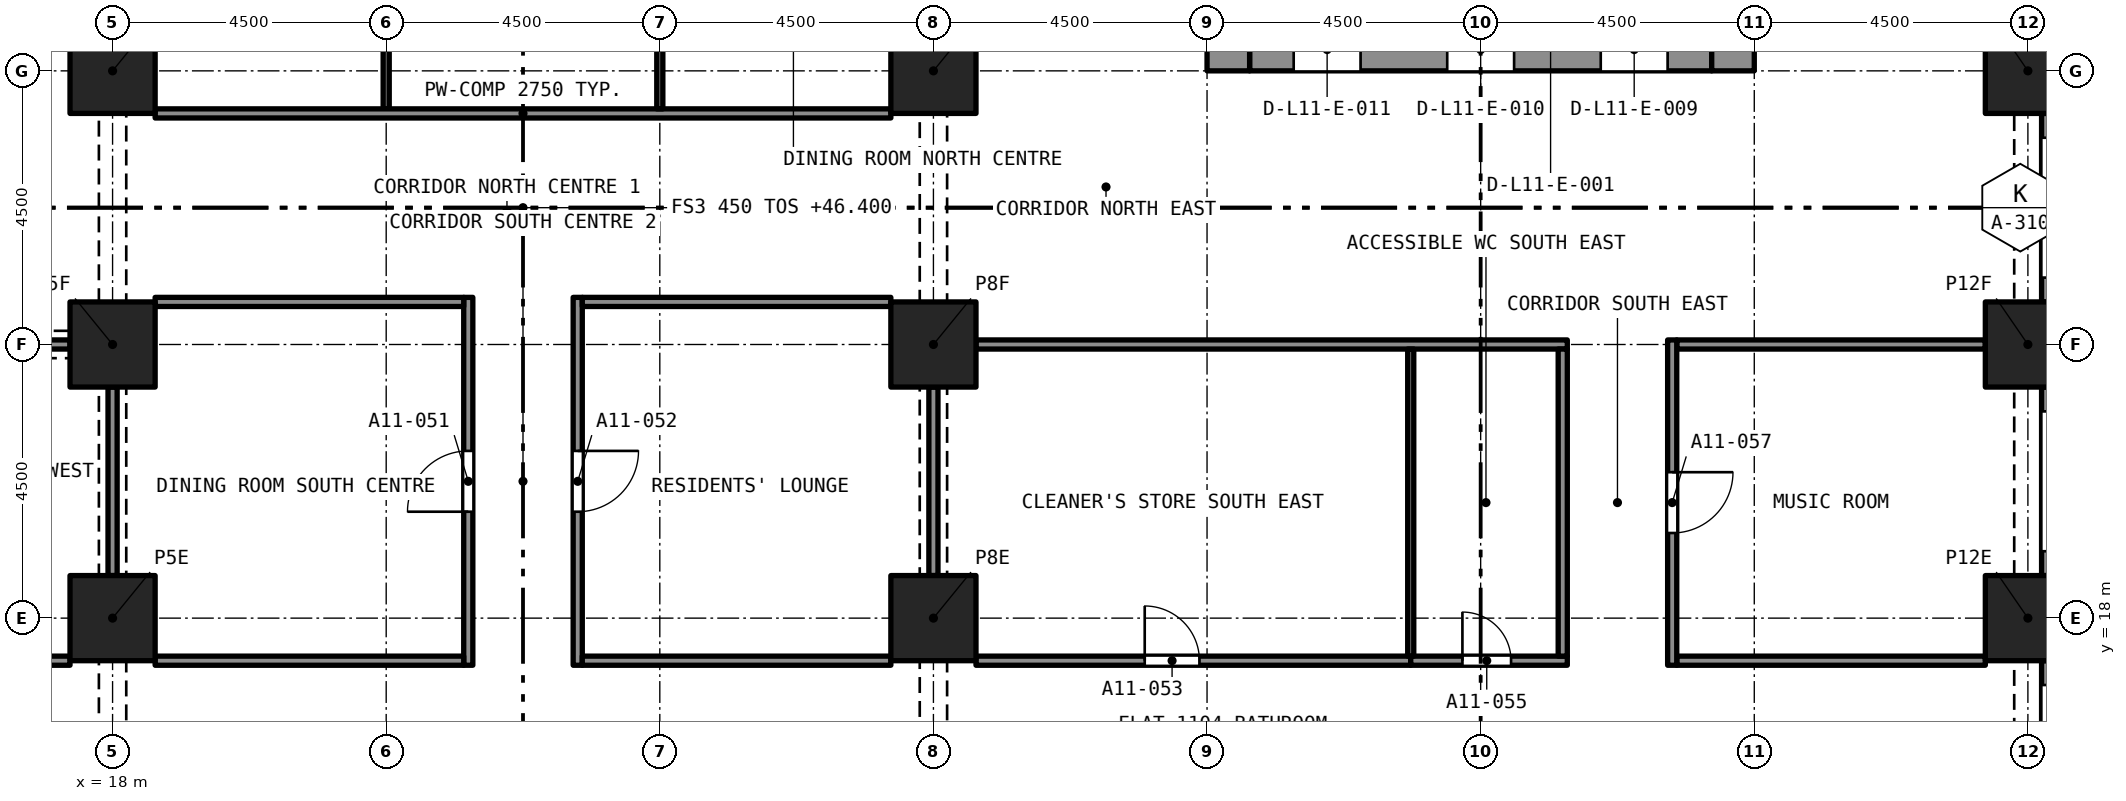
"""IFC4 building model, lengths in metres.
Left out: names, types, materials, properties, quantities, classifications, styles, units other than length and angle.
Written with IfcOpenShell. Run it as: python <this file> out.ifc"""

import sys

from ifc_helpers import new_model, si_unit, direction, frame, frame_2d, origin, origin_2d, place, context, subcontext, project, spatial, rectangle, extrude, element, fill, save


model = new_model("IFC4")
c1 = context("Model", 3, precision=1e-05, world=origin(), true_north=direction((0.0, 1.0)))
c2 = subcontext(c1, "Body", "Model", "MODEL_VIEW")
j1 = project(units=[si_unit("LENGTHUNIT", "METRE"), si_unit("PLANEANGLEUNIT", "RADIAN")], contexts=[c1])
p1 = place(None, origin())
s1 = spatial("IfcSite", under=j1, at=p1, CompositionType="ELEMENT")
p2 = place(p1, origin())
s2 = spatial("IfcBuilding", under=s1, at=p2, CompositionType="ELEMENT")
p3 = place(p2, frame((0.0, 0.0, 46.4)))
s3 = spatial("IfcBuildingStorey", under=s2, at=p3, CompositionType="ELEMENT", Elevation=46.4)
for number, where, z_axis, x_axis in (
    (1, (18.0, 18.0, 0.0), (0.0, 0.0, 1.0), (1.0, 0.0, 0.0)),
    (2, (31.5, 18.0, 0.0), (0.0, 0.0, 1.0), (1.0, 0.0, 0.0)),
    (3, (49.5, 18.0, 0.0), (0.0, 0.0, 1.0), (1.0, 0.0, 0.0)),
    (4, (18.0, 22.5, 0.0), (0.0, 0.0, 1.0), (1.0, 0.0, 0.0)),
    (5, (31.5, 22.5, 0.0), (0.0, 0.0, 1.0), (1.0, 0.0, 0.0)),
    (6, (49.5, 22.5, 0.0), (0.0, 0.0, 1.0), (1.0, 0.0, 0.0)),
    (7, (18.0, 27.0, 0.0), (0.0, 0.0, 1.0), (1.0, 0.0, 0.0)),
    (8, (31.5, 27.0, 0.0), (0.0, 0.0, 1.0), (1.0, 0.0, 0.0)),
    (9, (49.5, 27.0, 0.0), (0.0, 0.0, 1.0), (1.0, 0.0, 0.0)),
):
    element("IfcColumn", number, at=place(p3, frame(where, z_axis=z_axis, x_axis=x_axis)), inside=s3, PredefinedType="COLUMN", context=c2, shape_type="SweptSolid", body=[
        extrude(rectangle(XDim=1.4, YDim=1.4, at=origin_2d()), origin(), (0.0, 0.0, 1.0), 3.2),
    ])
p4 = place(p3, frame((36.7, 27.35, 0.0), z_axis=(0.0, 0.0, 1.0), x_axis=(1.0, 0.0, 0.0)))
e10 = element("IfcWall", 10, at=p4, inside=s3, PredefinedType="SOLIDWALL", context=c2, shape_type="SweptSolid", body=[
    extrude(rectangle(XDim=7.6, YDim=0.7, at=frame_2d((3.8, 0.0))), origin(), (0.0, 0.0, 1.0), 3.2),
])
p5 = place(p4, frame((5.775, 0.0, 0.0)))
e11 = element("IfcOpeningElement", 11, at=p5, cuts=e10, PredefinedType="OPENING", context=c2, shape_type="SweptSolid", body=[
    extrude(rectangle(XDim=1.1, YDim=2.1, at=frame_2d((0.55, 1.05))), frame((0.0, 0.36, 0.0), z_axis=(0.0, -1.0, 0.0), x_axis=(1.0, 0.0, 0.0)), (0.0, 0.0, 1.0), 0.72),
])
p6 = place(p4, frame((3.25, 0.0, 0.0)))
e12 = element("IfcOpeningElement", 12, at=p6, cuts=e10, PredefinedType="OPENING", context=c2, shape_type="SweptSolid", body=[
    extrude(rectangle(XDim=1.1, YDim=2.1, at=frame_2d((0.55, 1.05))), frame((0.0, 0.36, 0.0), z_axis=(0.0, -1.0, 0.0), x_axis=(1.0, 0.0, 0.0)), (0.0, 0.0, 1.0), 0.72),
])
p7 = place(p4, frame((0.725, 0.0, 0.0)))
e13 = element("IfcOpeningElement", 13, at=p7, cuts=e10, PredefinedType="OPENING", context=c2, shape_type="SweptSolid", body=[
    extrude(rectangle(XDim=1.1, YDim=2.1, at=frame_2d((0.55, 1.05))), frame((0.0, 0.36, 0.0), z_axis=(0.0, -1.0, 0.0), x_axis=(1.0, 0.0, 0.0)), (0.0, 0.0, 1.0), 0.72),
])
p8 = place(p3, frame((36.35, 27.0, 0.0), z_axis=(0.0, 0.0, 1.0), x_axis=(0.0, 1.0, 0.0)))
e14 = element("IfcWall", 14, at=p8, inside=s3, PredefinedType="SOLIDWALL", context=c2, shape_type="SweptSolid", body=[
    extrude(rectangle(XDim=13.5, YDim=0.7, at=frame_2d((6.75, 0.0))), origin(), (0.0, 0.0, 1.0), 3.2),
])
p9 = place(p8, frame((8.95, 0.0, 0.0)))
e15 = element("IfcOpeningElement", 15, at=p9, cuts=e14, PredefinedType="OPENING", context=c2, shape_type="SweptSolid", body=[
    extrude(rectangle(XDim=1.2, YDim=2.1, at=frame_2d((0.6, 1.05))), frame((0.0, 0.36, 0.0), z_axis=(0.0, -1.0, 0.0), x_axis=(1.0, 0.0, 0.0)), (0.0, 0.0, 1.0), 0.72),
])
p10 = place(p3, frame((44.65, 27.0, 0.0), z_axis=(0.0, 0.0, 1.0), x_axis=(0.0, 1.0, 0.0)))
e16 = element("IfcWall", 16, at=p10, inside=s3, PredefinedType="SOLIDWALL", context=c2, shape_type="SweptSolid", body=[
    extrude(rectangle(XDim=13.5, YDim=0.7, at=frame_2d((6.75, 0.0))), origin(), (0.0, 0.0, 1.0), 3.2),
])
p11 = place(p10, frame((8.95, 0.0, 0.0)))
e17 = element("IfcOpeningElement", 17, at=p11, cuts=e16, PredefinedType="OPENING", context=c2, shape_type="SweptSolid", body=[
    extrude(rectangle(XDim=1.2, YDim=2.1, at=frame_2d((0.6, 1.05))), frame((0.0, 0.36, 0.0), z_axis=(0.0, -1.0, 0.0), x_axis=(1.0, 0.0, 0.0)), (0.0, 0.0, 1.0), 0.72),
])
p12 = place(p3, frame((49.875, 17.3, 0.0), z_axis=(0.0, 0.0, 1.0), x_axis=(0.0, -1.0, 0.0)))
e18 = element("IfcWall", 18, at=p12, inside=s3, PredefinedType="SOLIDWALL", context=c2, shape_type="SweptSolid", body=[
    extrude(rectangle(XDim=3.1, YDim=0.3, at=frame_2d((1.55, 0.0))), origin(), (0.0, 0.0, 1.0), 3.2),
])
p13 = place(p12, frame((0.4, 0.0, 0.45)))
e19 = element("IfcOpeningElement", 19, at=p13, cuts=e18, PredefinedType="OPENING", context=c2, shape_type="SweptSolid", body=[
    extrude(rectangle(XDim=2.3, YDim=1.95, at=frame_2d((1.15, 0.975))), frame((0.0, 0.16, 0.0), z_axis=(0.0, -1.0, 0.0), x_axis=(1.0, 0.0, 0.0)), (0.0, 0.0, 1.0), 0.32),
])
p14 = place(p3, frame((49.875, 21.8, 0.0), z_axis=(0.0, 0.0, 1.0), x_axis=(0.0, -1.0, 0.0)))
e20 = element("IfcWall", 20, at=p14, inside=s3, PredefinedType="SOLIDWALL", context=c2, shape_type="SweptSolid", body=[
    extrude(rectangle(XDim=3.1, YDim=0.3, at=frame_2d((1.55, 0.0))), origin(), (0.0, 0.0, 1.0), 3.2),
])
p15 = place(p14, frame((0.4, 0.0, 0.45)))
e21 = element("IfcOpeningElement", 21, at=p15, cuts=e20, PredefinedType="OPENING", context=c2, shape_type="SweptSolid", body=[
    extrude(rectangle(XDim=2.3, YDim=1.95, at=frame_2d((1.15, 0.975))), frame((0.0, 0.16, 0.0), z_axis=(0.0, -1.0, 0.0), x_axis=(1.0, 0.0, 0.0)), (0.0, 0.0, 1.0), 0.32),
])
p16 = place(p3, frame((49.875, 26.3, 0.0), z_axis=(0.0, 0.0, 1.0), x_axis=(0.0, -1.0, 0.0)))
e22 = element("IfcWall", 22, at=p16, inside=s3, PredefinedType="SOLIDWALL", context=c2, shape_type="SweptSolid", body=[
    extrude(rectangle(XDim=3.1, YDim=0.3, at=frame_2d((1.55, 0.0))), origin(), (0.0, 0.0, 1.0), 3.2),
])
p17 = place(p16, frame((0.4, 0.0, 0.45)))
e23 = element("IfcOpeningElement", 23, at=p17, cuts=e22, PredefinedType="OPENING", context=c2, shape_type="SweptSolid", body=[
    extrude(rectangle(XDim=2.3, YDim=1.95, at=frame_2d((1.15, 0.975))), frame((0.0, 0.16, 0.0), z_axis=(0.0, -1.0, 0.0), x_axis=(1.0, 0.0, 0.0)), (0.0, 0.0, 1.0), 0.32),
])
p18 = place(p3, frame((23.85, 17.225, 0.0), z_axis=(0.0, 0.0, 1.0), x_axis=(0.0, 1.0, 0.0)))
e24 = element("IfcWall", 24, at=p18, inside=s3, PredefinedType="PARTITIONING", context=c2, shape_type="SweptSolid", body=[
    extrude(rectangle(XDim=6.05, YDim=0.15, at=frame_2d((3.025, 0.0))), origin(), (0.0, 0.0, 1.0), 2.75),
])
p19 = place(p18, frame((2.525, 0.0, 0.0)))
e25 = element("IfcOpeningElement", 25, at=p19, cuts=e24, PredefinedType="OPENING", context=c2, shape_type="SweptSolid", body=[
    extrude(rectangle(XDim=1.0, YDim=2.1, at=frame_2d((0.5, 1.05))), frame((0.0, 0.085, 0.0), z_axis=(0.0, -1.0, 0.0), x_axis=(1.0, 0.0, 0.0)), (0.0, 0.0, 1.0), 0.17),
])
p20 = place(p3, frame((25.65, 23.275, 0.0), z_axis=(0.0, 0.0, 1.0), x_axis=(0.0, -1.0, 0.0)))
e26 = element("IfcWall", 26, at=p20, inside=s3, PredefinedType="PARTITIONING", context=c2, shape_type="SweptSolid", body=[
    extrude(rectangle(XDim=6.05, YDim=0.15, at=frame_2d((3.025, 0.0))), origin(), (0.0, 0.0, 1.0), 2.75),
])
p21 = place(p20, frame((2.525, 0.0, 0.0)))
e27 = element("IfcOpeningElement", 27, at=p21, cuts=e26, PredefinedType="OPENING", context=c2, shape_type="SweptSolid", body=[
    extrude(rectangle(XDim=1.0, YDim=2.1, at=frame_2d((0.5, 1.05))), frame((0.0, 0.085, 0.0), z_axis=(0.0, -1.0, 0.0), x_axis=(1.0, 0.0, 0.0)), (0.0, 0.0, 1.0), 0.17),
])
for number, where, z_axis, x_axis in (
    (28, (18.7, 17.3, 0.0), (0.0, 0.0, 1.0), (1.0, 0.0, 0.0)),
    (29, (25.725, 17.3, 0.0), (0.0, 0.0, 1.0), (1.0, 0.0, 0.0)),
):
    element("IfcWall", number, at=place(p3, frame(where, z_axis=z_axis, x_axis=x_axis)), inside=s3, PredefinedType="PARTITIONING", context=c2, shape_type="SweptSolid", body=[
        extrude(rectangle(XDim=5.075, YDim=0.15, at=frame_2d((2.538, 0.0))), origin(), (0.0, 0.0, 1.0), 2.75),
    ])
p22 = place(p3, frame((32.2, 17.3, 0.0), z_axis=(0.0, 0.0, 1.0), x_axis=(1.0, 0.0, 0.0)))
e30 = element("IfcWall", 30, at=p22, inside=s3, PredefinedType="PARTITIONING", context=c2, shape_type="SweptSolid", body=[
    extrude(rectangle(XDim=7.15, YDim=0.15, at=frame_2d((3.575, 0.0))), origin(), (0.0, 0.0, 1.0), 2.9),
])
p23 = place(p22, frame((2.775, 0.0, 0.0)))
e31 = element("IfcOpeningElement", 31, at=p23, cuts=e30, PredefinedType="OPENING", context=c2, shape_type="SweptSolid", body=[
    extrude(rectangle(XDim=0.9, YDim=2.1, at=frame_2d((0.45, 1.05))), frame((0.0, 0.085, 0.0), z_axis=(0.0, -1.0, 0.0), x_axis=(1.0, 0.0, 0.0)), (0.0, 0.0, 1.0), 0.17),
])
p24 = place(p3, frame((10.15, 17.3, 0.0), z_axis=(0.0, 0.0, 1.0), x_axis=(1.0, 0.0, 0.0)))
e32 = element("IfcWall", 32, at=p24, inside=s3, PredefinedType="PARTITIONING", context=c2, shape_type="SweptSolid", body=[
    extrude(rectangle(XDim=7.15, YDim=0.15, at=frame_2d((3.575, 0.0))), origin(), (0.0, 0.0, 1.0), 2.9),
])
p25 = place(p24, frame((3.475, 0.0, 0.0)))
e33 = element("IfcOpeningElement", 33, at=p25, cuts=e32, PredefinedType="OPENING", context=c2, shape_type="SweptSolid", body=[
    extrude(rectangle(XDim=0.9, YDim=2.1, at=frame_2d((0.45, 1.05))), frame((0.0, 0.085, 0.0), z_axis=(0.0, -1.0, 0.0), x_axis=(1.0, 0.0, 0.0)), (0.0, 0.0, 1.0), 0.17),
])
p26 = place(p3, frame((39.35, 17.3, 0.0), z_axis=(0.0, 0.0, 1.0), x_axis=(1.0, 0.0, 0.0)))
e34 = element("IfcWall", 34, at=p26, inside=s3, PredefinedType="PARTITIONING", context=c2, shape_type="SweptSolid", body=[
    extrude(rectangle(XDim=2.575, YDim=0.15, at=frame_2d((1.288, 0.0))), origin(), (0.0, 0.0, 1.0), 2.9),
])
p27 = place(p26, frame((0.85, 0.0, 0.0)))
e35 = element("IfcOpeningElement", 35, at=p27, cuts=e34, PredefinedType="OPENING", context=c2, shape_type="SweptSolid", body=[
    extrude(rectangle(XDim=0.8, YDim=2.1, at=frame_2d((0.4, 1.05))), frame((0.0, 0.085, 0.0), z_axis=(0.0, -1.0, 0.0), x_axis=(1.0, 0.0, 0.0)), (0.0, 0.0, 1.0), 0.17),
])
p28 = place(p3, frame((43.725, 17.3, 0.0), z_axis=(0.0, 0.0, 1.0), x_axis=(1.0, 0.0, 0.0)))
e36 = element("IfcWall", 36, at=p28, inside=s3, PredefinedType="PARTITIONING", context=c2, shape_type="SweptSolid", body=[
    extrude(rectangle(XDim=5.075, YDim=0.15, at=frame_2d((2.538, 0.0))), origin(), (0.0, 0.0, 1.0), 2.9),
])
p29 = place(p3, frame((22.5, 26.375, 0.0), z_axis=(0.0, 0.0, 1.0), x_axis=(0.0, 1.0, 0.0)))
e37 = element("IfcWall", 37, at=p29, inside=s3, PredefinedType="PARTITIONING", context=c2, shape_type="SweptSolid", body=[
    extrude(rectangle(XDim=10.25, YDim=0.1, at=frame_2d((5.125, 0.0))), origin(), (0.0, 0.0, 1.0), 2.75),
])
p30 = place(p3, frame((18.7, 26.3, 0.0), z_axis=(0.0, 0.0, 1.0), x_axis=(1.0, 0.0, 0.0)))
e38 = element("IfcWall", 38, at=p30, inside=s3, PredefinedType="PARTITIONING", context=c2, shape_type="SweptSolid", body=[
    extrude(rectangle(XDim=12.1, YDim=0.15, at=frame_2d((6.05, 0.0))), origin(), (0.0, 0.0, 1.0), 2.75),
])
p31 = place(p3, frame((27.0, 26.375, 0.0), z_axis=(0.0, 0.0, 1.0), x_axis=(0.0, 1.0, 0.0)))
e39 = element("IfcWall", 39, at=p31, inside=s3, PredefinedType="PARTITIONING", context=c2, shape_type="SweptSolid", body=[
    extrude(rectangle(XDim=10.25, YDim=0.1, at=frame_2d((5.125, 0.0))), origin(), (0.0, 0.0, 1.0), 2.75),
])
p32 = place(p3, frame((18.7, 23.2, 0.0), z_axis=(0.0, 0.0, 1.0), x_axis=(1.0, 0.0, 0.0)))
e40 = element("IfcWall", 40, at=p32, inside=s3, PredefinedType="PARTITIONING", context=c2, shape_type="SweptSolid", body=[
    extrude(rectangle(XDim=5.075, YDim=0.15, at=frame_2d((2.538, 0.0))), origin(), (0.0, 0.0, 1.0), 2.75),
])
p33 = place(p3, frame((18.0, 18.7, 0.0), z_axis=(0.0, 0.0, 1.0), x_axis=(0.0, 1.0, 0.0)))
e41 = element("IfcWall", 41, at=p33, inside=s3, PredefinedType="PARTITIONING", context=c2, shape_type="SweptSolid", body=[
    extrude(rectangle(XDim=3.1, YDim=0.15, at=frame_2d((1.55, 0.0))), origin(), (0.0, 0.0, 1.0), 2.38),
])
p34 = place(p3, frame((25.725, 23.2, 0.0), z_axis=(0.0, 0.0, 1.0), x_axis=(1.0, 0.0, 0.0)))
e42 = element("IfcWall", 42, at=p34, inside=s3, PredefinedType="PARTITIONING", context=c2, shape_type="SweptSolid", body=[
    extrude(rectangle(XDim=5.075, YDim=0.15, at=frame_2d((2.538, 0.0))), origin(), (0.0, 0.0, 1.0), 2.75),
])
p35 = place(p3, frame((31.5, 18.7, 0.0), z_axis=(0.0, 0.0, 1.0), x_axis=(0.0, 1.0, 0.0)))
e43 = element("IfcWall", 43, at=p35, inside=s3, PredefinedType="PARTITIONING", context=c2, shape_type="SweptSolid", body=[
    extrude(rectangle(XDim=3.1, YDim=0.15, at=frame_2d((1.55, 0.0))), origin(), (0.0, 0.0, 1.0), 2.38),
])
p36 = place(p3, frame((32.2, 22.5, 0.0), z_axis=(0.0, 0.0, 1.0), x_axis=(1.0, 0.0, 0.0)))
e44 = element("IfcWall", 44, at=p36, inside=s3, PredefinedType="PARTITIONING", context=c2, shape_type="SweptSolid", body=[
    extrude(rectangle(XDim=9.725, YDim=0.15, at=frame_2d((4.863, 0.0))), origin(), (0.0, 0.0, 1.0), 2.9),
])
p37 = place(p3, frame((43.725, 22.5, 0.0), z_axis=(0.0, 0.0, 1.0), x_axis=(1.0, 0.0, 0.0)))
e45 = element("IfcWall", 45, at=p37, inside=s3, PredefinedType="PARTITIONING", context=c2, shape_type="SweptSolid", body=[
    extrude(rectangle(XDim=5.075, YDim=0.15, at=frame_2d((2.538, 0.0))), origin(), (0.0, 0.0, 1.0), 2.9),
])
p38 = place(p3, frame((14.2, 22.5, 0.0), z_axis=(0.0, 0.0, 1.0), x_axis=(1.0, 0.0, 0.0)))
e46 = element("IfcWall", 46, at=p38, inside=s3, PredefinedType="PARTITIONING", context=c2, shape_type="SweptSolid", body=[
    extrude(rectangle(XDim=3.1, YDim=0.15, at=frame_2d((1.55, 0.0))), origin(), (0.0, 0.0, 1.0), 2.38),
])
p39 = place(p3, frame((41.85, 17.375, 0.0), z_axis=(0.0, 0.0, 1.0), x_axis=(0.0, 1.0, 0.0)))
e47 = element("IfcWall", 47, at=p39, inside=s3, PredefinedType="PARTITIONING", context=c2, shape_type="SweptSolid", body=[
    extrude(rectangle(XDim=5.05, YDim=0.15, at=frame_2d((2.525, 0.0))), origin(), (0.0, 0.0, 1.0), 2.9),
])
p40 = place(p3, frame((43.65, 22.575, 0.0), z_axis=(0.0, 0.0, 1.0), x_axis=(0.0, -1.0, 0.0)))
e48 = element("IfcWall", 48, at=p40, inside=s3, PredefinedType="PARTITIONING", context=c2, shape_type="SweptSolid", body=[
    extrude(rectangle(XDim=5.35, YDim=0.15, at=frame_2d((2.675, 0.0))), origin(), (0.0, 0.0, 1.0), 2.9),
])
p41 = place(p40, frame((2.175, 0.0, 0.0)))
e49 = element("IfcOpeningElement", 49, at=p41, cuts=e48, PredefinedType="OPENING", context=c2, shape_type="SweptSolid", body=[
    extrude(rectangle(XDim=1.0, YDim=2.1, at=frame_2d((0.5, 1.05))), frame((0.0, 0.085, 0.0), z_axis=(0.0, -1.0, 0.0), x_axis=(1.0, 0.0, 0.0)), (0.0, 0.0, 1.0), 0.17),
])
p42 = place(p3, frame((39.35, 17.375, 0.0), z_axis=(0.0, 0.0, 1.0), x_axis=(0.0, 1.0, 0.0)))
e50 = element("IfcWall", 50, at=p42, inside=s3, PredefinedType="PARTITIONING", context=c2, shape_type="SweptSolid", body=[
    extrude(rectangle(XDim=5.05, YDim=0.1, at=frame_2d((2.525, 0.0))), origin(), (0.0, 0.0, 1.0), 2.9),
])
p43 = place(p19, origin())
e51 = element("IfcDoor", 51, at=p43, inside=s3, OperationType="SINGLE_SWING_RIGHT", PredefinedType="DOOR", context=c2, shape_type="SweptSolid", body=[
    extrude(rectangle(XDim=1.0, YDim=2.1, at=frame_2d((0.5, 1.05))), frame((0.0, 0.025, 0.0), z_axis=(0.0, -1.0, 0.0), x_axis=(1.0, 0.0, 0.0)), (0.0, 0.0, 1.0), 0.05),
])
fill(e25, e51)
p44 = place(p21, origin())
e52 = element("IfcDoor", 52, at=p44, inside=s3, OperationType="SINGLE_SWING_RIGHT", PredefinedType="DOOR", context=c2, shape_type="SweptSolid", body=[
    extrude(rectangle(XDim=1.0, YDim=2.1, at=frame_2d((0.5, 1.05))), frame((0.0, 0.025, 0.0), z_axis=(0.0, -1.0, 0.0), x_axis=(1.0, 0.0, 0.0)), (0.0, 0.0, 1.0), 0.05),
])
fill(e27, e52)
p45 = place(p23, origin())
e53 = element("IfcDoor", 53, at=p45, inside=s3, OperationType="SINGLE_SWING_LEFT", PredefinedType="DOOR", context=c2, shape_type="SweptSolid", body=[
    extrude(rectangle(XDim=0.9, YDim=2.1, at=frame_2d((0.45, 1.05))), frame((0.0, 0.025, 0.0), z_axis=(0.0, -1.0, 0.0), x_axis=(1.0, 0.0, 0.0)), (0.0, 0.0, 1.0), 0.05),
])
fill(e31, e53)
p46 = place(p27, origin())
e54 = element("IfcDoor", 54, at=p46, inside=s3, OperationType="SINGLE_SWING_LEFT", PredefinedType="DOOR", context=c2, shape_type="SweptSolid", body=[
    extrude(rectangle(XDim=0.8, YDim=2.1, at=frame_2d((0.4, 1.05))), frame((0.0, 0.025, 0.0), z_axis=(0.0, -1.0, 0.0), x_axis=(1.0, 0.0, 0.0)), (0.0, 0.0, 1.0), 0.05),
])
fill(e35, e54)
p47 = place(p41, origin())
e55 = element("IfcDoor", 55, at=p47, inside=s3, OperationType="SINGLE_SWING_RIGHT", PredefinedType="DOOR", context=c2, shape_type="SweptSolid", body=[
    extrude(rectangle(XDim=1.0, YDim=2.1, at=frame_2d((0.5, 1.05))), frame((0.0, 0.025, 0.0), z_axis=(0.0, -1.0, 0.0), x_axis=(1.0, 0.0, 0.0)), (0.0, 0.0, 1.0), 0.05),
])
fill(e49, e55)
save(model, sys.argv[1])
